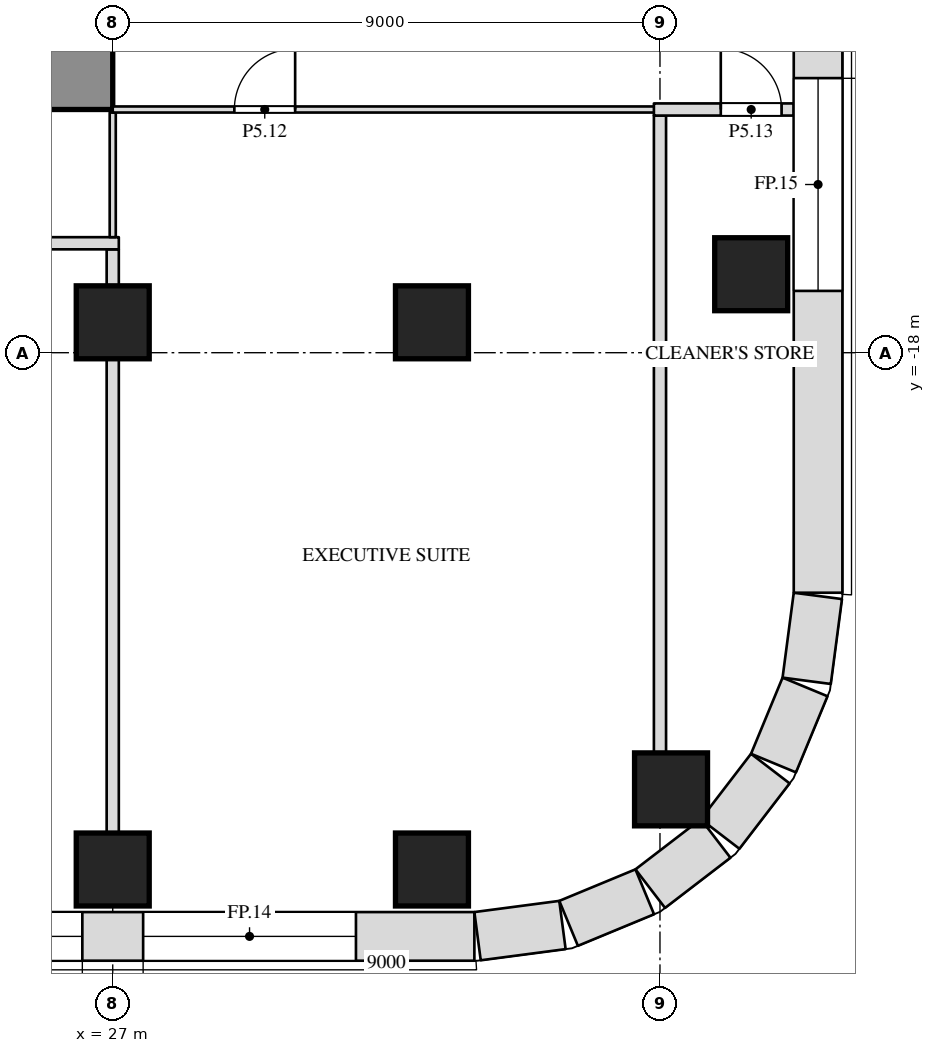
"""IFC4 building model, lengths in metres.
Left out: names, types, materials, properties, quantities, classifications, styles, units other than length and angle.
Written with IfcOpenShell. Run it as: python <this file> out.ifc"""

import sys

from ifc_helpers import new_model, si_unit, direction, frame, frame_2d, origin, origin_2d, place, context, subcontext, project, spatial, rectangle, extrude, element, fill, save


model = new_model("IFC4")
c1 = context("Model", 3, precision=1e-05, world=origin(), true_north=direction((0.0, 1.0)))
c2 = subcontext(c1, "Body", "Model", "MODEL_VIEW")
j1 = project(units=[si_unit("LENGTHUNIT", "METRE"), si_unit("PLANEANGLEUNIT", "RADIAN")], contexts=[c1])
p1 = place(None, origin())
s1 = spatial("IfcSite", under=j1, at=p1, CompositionType="ELEMENT")
p2 = place(p1, origin())
s2 = spatial("IfcBuilding", under=s1, at=p2, CompositionType="ELEMENT")
p3 = place(p2, frame((0.0, 0.0, 33.0)))
s3 = spatial("IfcBuildingStorey", under=s2, at=p3, CompositionType="ELEMENT", Elevation=33.0)
for number, where, z_axis, x_axis in (
    (1, (27.0, -26.5, 0.0), (0.0, 0.0, 1.0), (1.0, 0.0, 0.0)),
    (2, (32.25, -26.5, 0.0), (0.0, 0.0, 1.0), (1.0, 0.0, 0.0)),
    (3, (36.182, -25.182, 0.0), (0.0, 0.0, 1.0), (1.0, 0.0, 0.0)),
    (4, (27.0, -17.5, 0.0), (0.0, 0.0, 1.0), (1.0, 0.0, 0.0)),
    (5, (32.25, -17.5, 0.0), (0.0, 0.0, 1.0), (1.0, 0.0, 0.0)),
    (6, (37.5, -16.709, 0.0), (0.0, 0.0, 1.0), (1.0, 0.0, 0.0)),
):
    element("IfcColumn", number, at=place(p3, frame(where, z_axis=z_axis, x_axis=x_axis)), inside=s3, PredefinedType="COLUMN", context=c2, shape_type="SweptSolid", body=[
        extrude(rectangle(XDim=1.2, YDim=1.2, at=origin_2d()), origin(), (0.0, 0.0, 1.0), 6.0),
    ])
p4 = place(p3, frame((-27.0, -13.4, 0.0), z_axis=(0.0, 0.0, 1.0), x_axis=(1.0, 0.0, 0.0)))
e7 = element("IfcWall", 7, at=p4, inside=s3, PredefinedType="SHEAR", context=c2, shape_type="SweptSolid", body=[
    extrude(rectangle(XDim=54.0, YDim=1.2, at=frame_2d((27.0, 0.0))), origin(), (0.0, 0.0, 1.0), 5.75),
])
p5 = place(p4, frame((16.45, 0.0, 0.0)))
e8 = element("IfcOpeningElement", 8, at=p5, cuts=e7, PredefinedType="OPENING", context=c2, shape_type="SweptSolid", body=[
    extrude(rectangle(XDim=1.0, YDim=2.1, at=frame_2d((0.5, 1.05))), frame((0.0, 0.612, 0.0), z_axis=(0.0, -1.0, 0.0), x_axis=(1.0, 0.0, 0.0)), (0.0, 0.0, 1.0), 1.224),
])
p6 = place(p4, frame((36.55, 0.0, 0.0)))
e9 = element("IfcOpeningElement", 9, at=p6, cuts=e7, PredefinedType="OPENING", context=c2, shape_type="SweptSolid", body=[
    extrude(rectangle(XDim=1.0, YDim=2.1, at=frame_2d((0.5, 1.05))), frame((0.0, 0.612, 0.0), z_axis=(0.0, -1.0, 0.0), x_axis=(1.0, 0.0, 0.0)), (0.0, 0.0, 1.0), 1.224),
])
p7 = place(p3, frame((27.0, -25.9, 0.0), z_axis=(0.0, 0.0, 1.0), x_axis=(0.0, 1.0, 0.0)))
e10 = element("IfcWall", 10, at=p7, inside=s3, PredefinedType="PARTITIONING", context=c2, shape_type="SweptSolid", body=[
    extrude(rectangle(XDim=7.8, YDim=0.2, at=frame_2d((3.9, 0.0))), origin(), (0.0, 0.0, 1.0), 5.138),
])
p8 = place(p3, frame((27.0, -16.9, 0.0), z_axis=(0.0, 0.0, 1.0), x_axis=(0.0, 1.0, 0.0)))
e11 = element("IfcWall", 11, at=p8, inside=s3, PredefinedType="PARTITIONING", context=c2, shape_type="SweptSolid", body=[
    extrude(rectangle(XDim=0.6, YDim=0.2, at=frame_2d((0.3, 0.0))), origin(), (0.0, 0.0, 1.0), 5.138),
])
p9 = place(p3, frame((36.0, -24.582, 0.0), z_axis=(0.0, 0.0, 1.0), x_axis=(0.0, 1.0, 0.0)))
e12 = element("IfcWall", 12, at=p9, inside=s3, PredefinedType="PARTITIONING", context=c2, shape_type="SweptSolid", body=[
    extrude(rectangle(XDim=10.482, YDim=0.2, at=frame_2d((5.241, 0.0))), origin(), (0.0, 0.0, 1.0), 5.75),
])
p10 = place(p3, frame((17.1, -16.2, 0.0), z_axis=(0.0, 0.0, 1.0), x_axis=(1.0, 0.0, 0.0)))
e13 = element("IfcWall", 13, at=p10, inside=s3, PredefinedType="PARTITIONING", context=c2, shape_type="SweptSolid", body=[
    extrude(rectangle(XDim=10.0, YDim=0.2, at=frame_2d((5.0, 0.0))), origin(), (0.0, 0.0, 1.0), 5.75),
])
p11 = place(p10, frame((4.9, 0.0, 0.0)))
e14 = element("IfcOpeningElement", 14, at=p11, cuts=e13, PredefinedType="OPENING", context=c2, shape_type="SweptSolid", body=[
    extrude(rectangle(XDim=1.0, YDim=2.1, at=frame_2d((0.5, 1.05))), frame((0.0, 0.112, 0.0), z_axis=(0.0, -1.0, 0.0), x_axis=(1.0, 0.0, 0.0)), (0.0, 0.0, 1.0), 0.224),
])
p12 = place(p3, frame((27.0, -16.1, 0.0), z_axis=(0.0, 0.0, 1.0), x_axis=(0.0, 1.0, 0.0)))
e15 = element("IfcWall", 15, at=p12, inside=s3, PredefinedType="PARTITIONING", context=c2, shape_type="SweptSolid", body=[
    extrude(rectangle(XDim=2.05, YDim=0.1, at=frame_2d((1.025, 0.0))), origin(), (0.0, 0.0, 1.0), 5.138),
])
p13 = place(p3, frame((27.0, -14.0, 0.0), z_axis=(0.0, 0.0, 1.0), x_axis=(1.0, 0.0, 0.0)))
e16 = element("IfcWall", 16, at=p13, inside=s3, PredefinedType="PARTITIONING", context=c2, shape_type="SweptSolid", body=[
    extrude(rectangle(XDim=9.1, YDim=0.1, at=frame_2d((4.55, 0.0))), origin(), (0.0, 0.0, 1.0), 5.75),
])
p14 = place(p13, frame((2.0, 0.0, 0.0)))
e17 = element("IfcOpeningElement", 17, at=p14, cuts=e16, PredefinedType="OPENING", context=c2, shape_type="SweptSolid", body=[
    extrude(rectangle(XDim=1.0, YDim=2.1, at=frame_2d((0.5, 1.05))), frame((0.0, 0.062, 0.0), z_axis=(0.0, -1.0, 0.0), x_axis=(1.0, 0.0, 0.0)), (0.0, 0.0, 1.0), 0.124),
])
p15 = place(p3, frame((35.9, -14.0, 0.0), z_axis=(0.0, 0.0, 1.0), x_axis=(1.0, 0.0, 0.0)))
e18 = element("IfcWall", 18, at=p15, inside=s3, PredefinedType="PARTITIONING", context=c2, shape_type="SweptSolid", body=[
    extrude(rectangle(XDim=2.3, YDim=0.2, at=frame_2d((1.15, 0.0))), origin(), (0.0, 0.0, 1.0), 5.75),
])
p16 = place(p15, frame((1.1, 0.0, 0.0)))
e19 = element("IfcOpeningElement", 19, at=p16, cuts=e18, PredefinedType="OPENING", context=c2, shape_type="SweptSolid", body=[
    extrude(rectangle(XDim=1.0, YDim=2.1, at=frame_2d((0.5, 1.05))), frame((0.0, 0.112, 0.0), z_axis=(0.0, -1.0, 0.0), x_axis=(1.0, 0.0, 0.0)), (0.0, 0.0, 1.0), 0.224),
])
p17 = place(p3, frame((-32.948, -27.6, 0.0), z_axis=(0.0, 0.0, 1.0), x_axis=(1.0, 0.0, 0.0)))
e20 = element("IfcWall", 20, at=p17, inside=s3, PredefinedType="SOLIDWALL", context=c2, shape_type="SweptSolid", body=[
    extrude(rectangle(XDim=65.895, YDim=0.8, at=frame_2d((32.948, 0.0))), origin(), (0.0, 0.0, 1.0), 5.75),
])
p18 = place(p17, frame((1.948, 0.0, 1.0)))
e21 = element("IfcOpeningElement", 21, at=p18, cuts=e20, PredefinedType="OPENING", context=c2, shape_type="SweptSolid", body=[
    extrude(rectangle(XDim=3.5, YDim=4.0, at=frame_2d((1.75, 2.0))), frame((0.0, 0.412, 0.0), z_axis=(0.0, -1.0, 0.0), x_axis=(1.0, 0.0, 0.0)), (0.0, 0.0, 1.0), 0.824),
])
p19 = place(p17, frame((6.448, 0.0, 1.0)))
e22 = element("IfcOpeningElement", 22, at=p19, cuts=e20, PredefinedType="OPENING", context=c2, shape_type="SweptSolid", body=[
    extrude(rectangle(XDim=3.5, YDim=4.0, at=frame_2d((1.75, 2.0))), frame((0.0, 0.412, 0.0), z_axis=(0.0, -1.0, 0.0), x_axis=(1.0, 0.0, 0.0)), (0.0, 0.0, 1.0), 0.824),
])
p20 = place(p17, frame((10.948, 0.0, 1.0)))
e23 = element("IfcOpeningElement", 23, at=p20, cuts=e20, PredefinedType="OPENING", context=c2, shape_type="SweptSolid", body=[
    extrude(rectangle(XDim=3.5, YDim=4.0, at=frame_2d((1.75, 2.0))), frame((0.0, 0.412, 0.0), z_axis=(0.0, -1.0, 0.0), x_axis=(1.0, 0.0, 0.0)), (0.0, 0.0, 1.0), 0.824),
])
p21 = place(p17, frame((15.448, 0.0, 1.0)))
e24 = element("IfcOpeningElement", 24, at=p21, cuts=e20, PredefinedType="OPENING", context=c2, shape_type="SweptSolid", body=[
    extrude(rectangle(XDim=3.5, YDim=4.0, at=frame_2d((1.75, 2.0))), frame((0.0, 0.412, 0.0), z_axis=(0.0, -1.0, 0.0), x_axis=(1.0, 0.0, 0.0)), (0.0, 0.0, 1.0), 0.824),
])
p22 = place(p17, frame((19.948, 0.0, 1.0)))
e25 = element("IfcOpeningElement", 25, at=p22, cuts=e20, PredefinedType="OPENING", context=c2, shape_type="SweptSolid", body=[
    extrude(rectangle(XDim=3.5, YDim=4.0, at=frame_2d((1.75, 2.0))), frame((0.0, 0.412, 0.0), z_axis=(0.0, -1.0, 0.0), x_axis=(1.0, 0.0, 0.0)), (0.0, 0.0, 1.0), 0.824),
])
p23 = place(p17, frame((24.448, 0.0, 1.0)))
e26 = element("IfcOpeningElement", 26, at=p23, cuts=e20, PredefinedType="OPENING", context=c2, shape_type="SweptSolid", body=[
    extrude(rectangle(XDim=3.5, YDim=4.0, at=frame_2d((1.75, 2.0))), frame((0.0, 0.412, 0.0), z_axis=(0.0, -1.0, 0.0), x_axis=(1.0, 0.0, 0.0)), (0.0, 0.0, 1.0), 0.824),
])
p24 = place(p17, frame((28.948, 0.0, 1.0)))
e27 = element("IfcOpeningElement", 27, at=p24, cuts=e20, PredefinedType="OPENING", context=c2, shape_type="SweptSolid", body=[
    extrude(rectangle(XDim=3.5, YDim=4.0, at=frame_2d((1.75, 2.0))), frame((0.0, 0.412, 0.0), z_axis=(0.0, -1.0, 0.0), x_axis=(1.0, 0.0, 0.0)), (0.0, 0.0, 1.0), 0.824),
])
p25 = place(p17, frame((33.448, 0.0, 1.0)))
e28 = element("IfcOpeningElement", 28, at=p25, cuts=e20, PredefinedType="OPENING", context=c2, shape_type="SweptSolid", body=[
    extrude(rectangle(XDim=3.5, YDim=4.0, at=frame_2d((1.75, 2.0))), frame((0.0, 0.412, 0.0), z_axis=(0.0, -1.0, 0.0), x_axis=(1.0, 0.0, 0.0)), (0.0, 0.0, 1.0), 0.824),
])
p26 = place(p17, frame((37.948, 0.0, 1.0)))
e29 = element("IfcOpeningElement", 29, at=p26, cuts=e20, PredefinedType="OPENING", context=c2, shape_type="SweptSolid", body=[
    extrude(rectangle(XDim=3.5, YDim=4.0, at=frame_2d((1.75, 2.0))), frame((0.0, 0.412, 0.0), z_axis=(0.0, -1.0, 0.0), x_axis=(1.0, 0.0, 0.0)), (0.0, 0.0, 1.0), 0.824),
])
p27 = place(p17, frame((42.448, 0.0, 1.0)))
e30 = element("IfcOpeningElement", 30, at=p27, cuts=e20, PredefinedType="OPENING", context=c2, shape_type="SweptSolid", body=[
    extrude(rectangle(XDim=3.5, YDim=4.0, at=frame_2d((1.75, 2.0))), frame((0.0, 0.412, 0.0), z_axis=(0.0, -1.0, 0.0), x_axis=(1.0, 0.0, 0.0)), (0.0, 0.0, 1.0), 0.824),
])
p28 = place(p17, frame((46.948, 0.0, 1.0)))
e31 = element("IfcOpeningElement", 31, at=p28, cuts=e20, PredefinedType="OPENING", context=c2, shape_type="SweptSolid", body=[
    extrude(rectangle(XDim=3.5, YDim=4.0, at=frame_2d((1.75, 2.0))), frame((0.0, 0.412, 0.0), z_axis=(0.0, -1.0, 0.0), x_axis=(1.0, 0.0, 0.0)), (0.0, 0.0, 1.0), 0.824),
])
p29 = place(p17, frame((51.448, 0.0, 1.0)))
e32 = element("IfcOpeningElement", 32, at=p29, cuts=e20, PredefinedType="OPENING", context=c2, shape_type="SweptSolid", body=[
    extrude(rectangle(XDim=3.5, YDim=4.0, at=frame_2d((1.75, 2.0))), frame((0.0, 0.412, 0.0), z_axis=(0.0, -1.0, 0.0), x_axis=(1.0, 0.0, 0.0)), (0.0, 0.0, 1.0), 0.824),
])
p30 = place(p17, frame((55.948, 0.0, 1.0)))
e33 = element("IfcOpeningElement", 33, at=p30, cuts=e20, PredefinedType="OPENING", context=c2, shape_type="SweptSolid", body=[
    extrude(rectangle(XDim=3.5, YDim=4.0, at=frame_2d((1.75, 2.0))), frame((0.0, 0.412, 0.0), z_axis=(0.0, -1.0, 0.0), x_axis=(1.0, 0.0, 0.0)), (0.0, 0.0, 1.0), 0.824),
])
p31 = place(p17, frame((60.448, 0.0, 1.0)))
e34 = element("IfcOpeningElement", 34, at=p31, cuts=e20, PredefinedType="OPENING", context=c2, shape_type="SweptSolid", body=[
    extrude(rectangle(XDim=3.5, YDim=4.0, at=frame_2d((1.75, 2.0))), frame((0.0, 0.412, 0.0), z_axis=(0.0, -1.0, 0.0), x_axis=(1.0, 0.0, 0.0)), (0.0, 0.0, 1.0), 0.824),
])
p32 = place(p3, frame((33.0, -27.597, 0.0), z_axis=(0.0, 0.0, 1.0), x_axis=(0.99144603414, 0.130517283865, 0.0)))
e35 = element("IfcWall", 35, at=p32, inside=s3, PredefinedType="SOLIDWALL", context=c2, shape_type="SweptSolid", body=[
    extrude(rectangle(XDim=1.408, YDim=0.8, at=frame_2d((0.704, 0.0))), origin(), (0.0, 0.0, 1.0), 5.75),
])
p33 = place(p3, frame((34.497, -27.386, 0.0), z_axis=(0.0, 0.0, 1.0), x_axis=(0.923847774587, 0.38276009378, 0.0)))
e36 = element("IfcWall", 36, at=p33, inside=s3, PredefinedType="SOLIDWALL", context=c2, shape_type="SweptSolid", body=[
    extrude(rectangle(XDim=1.355, YDim=0.8, at=frame_2d((0.678, 0.0))), origin(), (0.0, 0.0, 1.0), 5.75),
])
for number, where, z_axis, x_axis in (
    (37, (35.84, -26.815, 0.0), (0.0, 0.0, 1.0), (0.793, 0.609, 0.0)),
    (38, (36.989, -25.916, 0.0), (0.0, 0.0, 1.0), (0.609, 0.793, 0.0)),
):
    element("IfcWall", number, at=place(p3, frame(where, z_axis=z_axis, x_axis=x_axis)), inside=s3, PredefinedType="SOLIDWALL", context=c2, shape_type="SweptSolid", body=[
        extrude(rectangle(XDim=1.356, YDim=0.8, at=frame_2d((0.678, 0.0))), origin(), (0.0, 0.0, 1.0), 5.75),
    ])
p34 = place(p3, frame((37.867, -24.75, 0.0), z_axis=(0.0, 0.0, 1.0), x_axis=(0.38276009378, 0.923847774587, 0.0)))
e39 = element("IfcWall", 39, at=p34, inside=s3, PredefinedType="SOLIDWALL", context=c2, shape_type="SweptSolid", body=[
    extrude(rectangle(XDim=1.355, YDim=0.8, at=frame_2d((0.678, 0.0))), origin(), (0.0, 0.0, 1.0), 5.75),
])
p35 = place(p3, frame((38.413, -23.396, 0.0), z_axis=(0.0, 0.0, 1.0), x_axis=(0.130517283865, 0.99144603414, 0.0)))
e40 = element("IfcWall", 40, at=p35, inside=s3, PredefinedType="SOLIDWALL", context=c2, shape_type="SweptSolid", body=[
    extrude(rectangle(XDim=1.408, YDim=0.8, at=frame_2d((0.704, 0.0))), origin(), (0.0, 0.0, 1.0), 5.75),
])
p36 = place(p3, frame((38.6, -21.948, 0.0), z_axis=(0.0, 0.0, 1.0), x_axis=(0.0, 1.0, 0.0)))
e41 = element("IfcWall", 41, at=p36, inside=s3, PredefinedType="SOLIDWALL", context=c2, shape_type="SweptSolid", body=[
    extrude(rectangle(XDim=35.895, YDim=0.8, at=frame_2d((17.948, 0.0))), origin(), (0.0, 0.0, 1.0), 5.75),
])
p37 = place(p36, frame((4.964, 0.0, 1.0)))
e42 = element("IfcOpeningElement", 42, at=p37, cuts=e41, PredefinedType="OPENING", context=c2, shape_type="SweptSolid", body=[
    extrude(rectangle(XDim=3.5, YDim=4.0, at=frame_2d((1.75, 2.0))), frame((0.0, 0.412, 0.0), z_axis=(0.0, -1.0, 0.0), x_axis=(1.0, 0.0, 0.0)), (0.0, 0.0, 1.0), 0.824),
])
p38 = place(p36, frame((9.458, 0.0, 1.0)))
e43 = element("IfcOpeningElement", 43, at=p38, cuts=e41, PredefinedType="OPENING", context=c2, shape_type="SweptSolid", body=[
    extrude(rectangle(XDim=3.5, YDim=4.0, at=frame_2d((1.75, 2.0))), frame((0.0, 0.412, 0.0), z_axis=(0.0, -1.0, 0.0), x_axis=(1.0, 0.0, 0.0)), (0.0, 0.0, 1.0), 0.824),
])
p39 = place(p36, frame((13.951, 0.0, 1.0)))
e44 = element("IfcOpeningElement", 44, at=p39, cuts=e41, PredefinedType="OPENING", context=c2, shape_type="SweptSolid", body=[
    extrude(rectangle(XDim=3.5, YDim=4.0, at=frame_2d((1.75, 2.0))), frame((0.0, 0.412, 0.0), z_axis=(0.0, -1.0, 0.0), x_axis=(1.0, 0.0, 0.0)), (0.0, 0.0, 1.0), 0.824),
])
p40 = place(p36, frame((18.444, 0.0, 1.0)))
e45 = element("IfcOpeningElement", 45, at=p40, cuts=e41, PredefinedType="OPENING", context=c2, shape_type="SweptSolid", body=[
    extrude(rectangle(XDim=3.5, YDim=4.0, at=frame_2d((1.75, 2.0))), frame((0.0, 0.412, 0.0), z_axis=(0.0, -1.0, 0.0), x_axis=(1.0, 0.0, 0.0)), (0.0, 0.0, 1.0), 0.824),
])
p41 = place(p36, frame((22.938, 0.0, 1.0)))
e46 = element("IfcOpeningElement", 46, at=p41, cuts=e41, PredefinedType="OPENING", context=c2, shape_type="SweptSolid", body=[
    extrude(rectangle(XDim=3.5, YDim=4.0, at=frame_2d((1.75, 2.0))), frame((0.0, 0.412, 0.0), z_axis=(0.0, -1.0, 0.0), x_axis=(1.0, 0.0, 0.0)), (0.0, 0.0, 1.0), 0.824),
])
p42 = place(p36, frame((27.431, 0.0, 1.0)))
e47 = element("IfcOpeningElement", 47, at=p42, cuts=e41, PredefinedType="OPENING", context=c2, shape_type="SweptSolid", body=[
    extrude(rectangle(XDim=3.5, YDim=4.0, at=frame_2d((1.75, 2.0))), frame((0.0, 0.412, 0.0), z_axis=(0.0, -1.0, 0.0), x_axis=(1.0, 0.0, 0.0)), (0.0, 0.0, 1.0), 0.824),
])
p43 = place(p14, origin())
e48 = element("IfcDoor", 48, at=p43, inside=s3, OperationType="SINGLE_SWING_RIGHT", PredefinedType="DOOR", context=c2, shape_type="SweptSolid", body=[
    extrude(rectangle(XDim=1.0, YDim=2.1, at=frame_2d((0.5, 1.05))), frame((0.0, 0.025, 0.0), z_axis=(0.0, -1.0, 0.0), x_axis=(1.0, 0.0, 0.0)), (0.0, 0.0, 1.0), 0.05),
])
fill(e17, e48)
p44 = place(p16, origin())
e49 = element("IfcDoor", 49, at=p44, inside=s3, OperationType="SINGLE_SWING_LEFT", PredefinedType="DOOR", context=c2, shape_type="SweptSolid", body=[
    extrude(rectangle(XDim=1.0, YDim=2.1, at=frame_2d((0.5, 1.05))), frame((0.0, 0.025, 0.0), z_axis=(0.0, -1.0, 0.0), x_axis=(1.0, 0.0, 0.0)), (0.0, 0.0, 1.0), 0.05),
])
fill(e19, e49)
p45 = place(p30, origin())
e50 = element("IfcWindow", 50, at=p45, inside=s3, PartitioningType="SINGLE_PANEL", PredefinedType="WINDOW", context=c2, shape_type="SweptSolid", body=[
    extrude(rectangle(XDim=3.5, YDim=4.0, at=frame_2d((1.75, 2.0))), frame((0.0, 0.03, 0.0), z_axis=(0.0, -1.0, 0.0), x_axis=(1.0, 0.0, 0.0)), (0.0, 0.0, 1.0), 0.06),
])
fill(e33, e50)
p46 = place(p31, origin())
e51 = element("IfcWindow", 51, at=p46, inside=s3, PartitioningType="SINGLE_PANEL", PredefinedType="WINDOW", context=c2, shape_type="SweptSolid", body=[
    extrude(rectangle(XDim=3.5, YDim=4.0, at=frame_2d((1.75, 2.0))), frame((0.0, 0.03, 0.0), z_axis=(0.0, -1.0, 0.0), x_axis=(1.0, 0.0, 0.0)), (0.0, 0.0, 1.0), 0.06),
])
fill(e34, e51)
p47 = place(p37, origin())
e52 = element("IfcWindow", 52, at=p47, inside=s3, PartitioningType="SINGLE_PANEL", PredefinedType="WINDOW", context=c2, shape_type="SweptSolid", body=[
    extrude(rectangle(XDim=3.5, YDim=4.0, at=frame_2d((1.75, 2.0))), frame((0.0, 0.03, 0.0), z_axis=(0.0, -1.0, 0.0), x_axis=(1.0, 0.0, 0.0)), (0.0, 0.0, 1.0), 0.06),
])
fill(e42, e52)
save(model, sys.argv[1])
